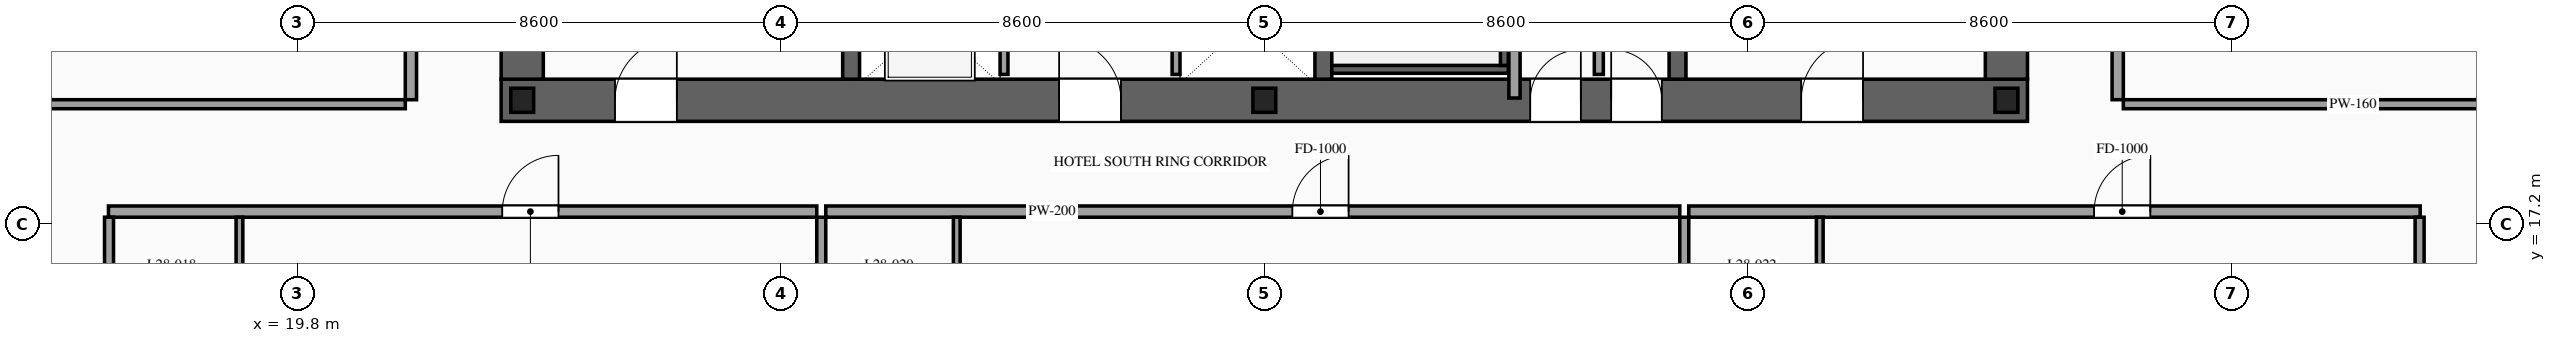
"""IFC4 building model, lengths in metres.
Left out: names, types, materials, properties, quantities, classifications, styles, units other than length and angle.
Written with IfcOpenShell. Run it as: python <this file> out.ifc"""

import sys

from ifc_helpers import new_model, si_unit, direction, frame, frame_2d, origin, origin_2d, place, context, subcontext, project, spatial, rectangle, i_section, extrude, source, transform, mapped, element, fill, save


model = new_model("IFC4")
c1 = context("Model", 3, precision=1e-05, world=origin(), true_north=direction((0.0, 1.0)))
c2 = subcontext(c1, "Body", "Model", "MODEL_VIEW")
j1 = project(units=[si_unit("LENGTHUNIT", "METRE"), si_unit("PLANEANGLEUNIT", "RADIAN")], contexts=[c1])
p1 = place(None, origin())
s1 = spatial("IfcSite", under=j1, at=p1, CompositionType="ELEMENT")
p2 = place(p1, origin())
s2 = spatial("IfcBuilding", under=s1, at=p2, CompositionType="ELEMENT")
p3 = place(p2, frame((0.0, 0.0, 108.2)))
s3 = spatial("IfcBuildingStorey", under=s2, at=p3, CompositionType="ELEMENT", Elevation=108.2)
p4 = place(p3, frame((23.425, 19.4, 0.0), z_axis=(0.0, 0.0, 1.0), x_axis=(1.0, 0.0, 0.0)))
e1 = element("IfcWall", 1, at=p4, inside=s3, PredefinedType="SHEAR", context=c2, shape_type="SweptSolid", body=[
    extrude(rectangle(XDim=27.15, YDim=0.75, at=frame_2d((13.575, 0.0))), origin(), (0.0, 0.0, 1.0), 3.6),
])
p5 = place(p4, frame((2.025, 0.0, 0.0)))
e2 = element("IfcOpeningElement", 2, at=p5, cuts=e1, PredefinedType="OPENING", context=c2, shape_type="SweptSolid", body=[
    extrude(rectangle(XDim=1.1, YDim=2.2, at=frame_2d((0.55, 1.1))), frame((0.0, 0.39, 0.0), z_axis=(0.0, -1.0, 0.0), x_axis=(1.0, 0.0, 0.0)), (0.0, 0.0, 1.0), 0.78),
])
p6 = place(p4, frame((9.925, 0.0, 0.0)))
e3 = element("IfcOpeningElement", 3, at=p6, cuts=e1, PredefinedType="OPENING", context=c2, shape_type="SweptSolid", body=[
    extrude(rectangle(XDim=1.1, YDim=2.2, at=frame_2d((0.55, 1.1))), frame((0.0, 0.39, 0.0), z_axis=(0.0, -1.0, 0.0), x_axis=(1.0, 0.0, 0.0)), (0.0, 0.0, 1.0), 0.78),
])
p7 = place(p4, frame((23.125, 0.0, 0.0)))
e4 = element("IfcOpeningElement", 4, at=p7, cuts=e1, PredefinedType="OPENING", context=c2, shape_type="SweptSolid", body=[
    extrude(rectangle(XDim=1.1, YDim=2.2, at=frame_2d((0.55, 1.1))), frame((0.0, 0.39, 0.0), z_axis=(0.0, -1.0, 0.0), x_axis=(1.0, 0.0, 0.0)), (0.0, 0.0, 1.0), 0.78),
])
p8 = place(p4, frame((19.745, 0.0, 0.0)))
e5 = element("IfcOpeningElement", 5, at=p8, cuts=e1, PredefinedType="OPENING", context=c2, shape_type="SweptSolid", body=[
    extrude(rectangle(XDim=0.9, YDim=2.15, at=frame_2d((0.45, 1.075))), frame((0.0, 0.39, 0.0), z_axis=(0.0, -1.0, 0.0), x_axis=(1.0, 0.0, 0.0)), (0.0, 0.0, 1.0), 0.78),
])
p9 = place(p4, frame((18.305, 0.0, 0.0)))
e6 = element("IfcOpeningElement", 6, at=p9, cuts=e1, PredefinedType="OPENING", context=c2, shape_type="SweptSolid", body=[
    extrude(rectangle(XDim=0.9, YDim=2.15, at=frame_2d((0.45, 1.075))), frame((0.0, 0.39, 0.0), z_axis=(0.0, -1.0, 0.0), x_axis=(1.0, 0.0, 0.0)), (0.0, 0.0, 1.0), 0.78),
])
m1 = source(origin(), c2, "Body", "SweptSolid", [
    extrude(rectangle(XDim=12.05, YDim=0.75, at=frame_2d((6.025, 0.0))), origin(), (0.0, 0.0, 1.0), 3.6),
])
for number, where, z_axis, x_axis in (
    (7, (23.8, 19.775, 0.0), (0.0, 0.0, 1.0), (0.0, 1.0, 0.0)),
    (8, (50.2, 19.775, 0.0), (0.0, 0.0, 1.0), (0.0, 1.0, 0.0)),
):
    element("IfcWall", number, at=place(p3, frame(where, z_axis=z_axis, x_axis=x_axis)), inside=s3, PredefinedType="SHEAR", context=c2, shape_type="MappedRepresentation", body=[
        mapped(m1, transform((0.0, 0.0, 0.0), scale=1.0)),
    ])
m2 = source(origin(), c2, "Body", "SweptSolid", [
    extrude(rectangle(XDim=12.05, YDim=0.3, at=frame_2d((6.025, 0.0))), origin(), (0.0, 0.0, 1.0), 3.6),
])
for number, where, z_axis, x_axis in (
    (9, (29.65, 19.775, 0.0), (0.0, 0.0, 1.0), (0.0, 1.0, 0.0)),
    (10, (38.05, 19.775, 0.0), (0.0, 0.0, 1.0), (0.0, 1.0, 0.0)),
    (11, (44.35, 19.775, 0.0), (0.0, 0.0, 1.0), (0.0, 1.0, 0.0)),
):
    element("IfcWall", number, at=place(p3, frame(where, z_axis=z_axis, x_axis=x_axis)), inside=s3, PredefinedType="SOLIDWALL", context=c2, shape_type="MappedRepresentation", body=[
        mapped(m2, transform((0.0, 0.0, 0.0), scale=1.0)),
    ])
m3 = source(origin(), c2, "Body", "SweptSolid", [
    extrude(i_section(OverallWidth=0.407, OverallDepth=0.428, WebThickness=0.02, FlangeThickness=0.035, at=origin_2d()), origin(), (0.0, 0.0, 1.0), 3.6),
])
for number, where, z_axis, x_axis in (
    (12, (23.8, 19.4, 0.0), (0.0, 0.0, 1.0), (1.0, 0.0, 0.0)),
    (13, (37.0, 19.4, 0.0), (0.0, 0.0, 1.0), (1.0, 0.0, 0.0)),
    (14, (50.2, 19.4, 0.0), (0.0, 0.0, 1.0), (1.0, 0.0, 0.0)),
):
    element("IfcColumn", number, at=place(p3, frame(where, z_axis=z_axis, x_axis=x_axis)), inside=s3, PredefinedType="COLUMN", context=c2, shape_type="MappedRepresentation", body=[
        mapped(m3, transform((0.0, 0.0, 0.0), scale=1.0)),
    ])
p10 = place(p3, frame((32.37, 19.86, 0.0), z_axis=(0.0, 0.0, 1.0), x_axis=(0.0, 1.0, 0.0)))
e15 = element("IfcWall", 15, at=p10, inside=s3, PredefinedType="SOLIDWALL", context=c2, shape_type="SweptSolid", body=[
    extrude(rectangle(XDim=2.04, YDim=0.14, at=frame_2d((1.02, 0.0))), origin(), (0.0, 0.0, 1.0), 3.38),
])
p11 = place(p10, frame((0.47, 0.0, 0.0)))
e16 = element("IfcOpeningElement", 16, at=p11, cuts=e15, PredefinedType="OPENING", context=c2, shape_type="SweptSolid", body=[
    extrude(rectangle(XDim=1.1, YDim=2.2, at=frame_2d((0.55, 1.1))), frame((0.0, 0.085, 0.0), z_axis=(0.0, -1.0, 0.0), x_axis=(1.0, 0.0, 0.0)), (0.0, 0.0, 1.0), 0.17),
])
m4 = source(origin(), c2, "Body", "SweptSolid", [
    extrude(rectangle(XDim=2.04, YDim=0.14, at=frame_2d((1.02, 0.0))), origin(), (0.0, 0.0, 1.0), 3.38),
])
p12 = place(p3, frame((35.43, 19.86, 0.0), z_axis=(0.0, 0.0, 1.0), x_axis=(0.0, 1.0, 0.0)))
e17 = element("IfcWall", 17, at=p12, inside=s3, PredefinedType="SOLIDWALL", context=c2, shape_type="MappedRepresentation", body=[
    mapped(m4, transform((0.0, 0.0, 0.0), scale=1.0)),
])
m5 = source(origin(), c2, "Body", "SweptSolid", [
    extrude(rectangle(XDim=3.14, YDim=0.14, at=frame_2d((1.57, 0.0))), origin(), (0.0, 0.0, 1.0), 3.38),
])
p13 = place(p3, frame((38.2, 19.95, 0.0), z_axis=(0.0, 0.0, 1.0), x_axis=(1.0, 0.0, 0.0)))
e18 = element("IfcWall", 18, at=p13, inside=s3, PredefinedType="SOLIDWALL", context=c2, shape_type="MappedRepresentation", body=[
    mapped(m5, transform((0.0, 0.0, 0.0), scale=1.0)),
])
m6 = source(origin(), c2, "Body", "SweptSolid", [
    extrude(rectangle(XDim=8.94, YDim=0.14, at=frame_2d((4.47, 0.0))), origin(), (0.0, 0.0, 1.0), 3.38),
])
p14 = place(p3, frame((41.27, 20.02, 0.0), z_axis=(0.0, 0.0, 1.0), x_axis=(0.0, 1.0, 0.0)))
e19 = element("IfcWall", 19, at=p14, inside=s3, PredefinedType="SOLIDWALL", context=c2, shape_type="MappedRepresentation", body=[
    mapped(m6, transform((0.0, 0.0, 0.0), scale=1.0)),
])
m7 = source(origin(), c2, "Body", "SweptSolid", [
    extrude(rectangle(XDim=1.34, YDim=0.16, at=frame_2d((0.67, 0.0))), origin(), (0.0, 0.0, 1.0), 3.38),
])
p15 = place(p3, frame((42.95, 19.86, 0.0), z_axis=(0.0, 0.0, 1.0), x_axis=(0.0, 1.0, 0.0)))
e20 = element("IfcWall", 20, at=p15, inside=s3, PredefinedType="PARTITIONING", context=c2, shape_type="MappedRepresentation", body=[
    mapped(m7, transform((0.0, 0.0, 0.0), scale=1.0)),
])
m8 = source(origin(), c2, "Body", "SweptSolid", [
    extrude(rectangle(XDim=12.72, YDim=0.2, at=frame_2d((6.36, 0.0))), origin(), (0.0, 0.0, 1.0), 3.38),
])
p16 = place(p3, frame((41.45, 19.44, 0.0), z_axis=(0.0, 0.0, 1.0), x_axis=(0.0, 1.0, 0.0)))
e21 = element("IfcWall", 21, at=p16, inside=s3, PredefinedType="PARTITIONING", context=c2, shape_type="MappedRepresentation", body=[
    mapped(m8, transform((0.0, 0.0, 0.0), scale=1.0)),
])
p17 = place(p3, frame((16.44, 17.42, 0.0), z_axis=(0.0, 0.0, 1.0), x_axis=(1.0, 0.0, 0.0)))
e22 = element("IfcWall", 22, at=p17, inside=s3, PredefinedType="PARTITIONING", context=c2, shape_type="SweptSolid", body=[
    extrude(rectangle(XDim=12.599, YDim=0.2, at=frame_2d((6.3, 0.0))), origin(), (0.0, 0.0, 1.0), 3.38),
])
p18 = place(p17, frame((7.005, 0.0, 0.0)))
e23 = element("IfcOpeningElement", 23, at=p18, cuts=e22, PredefinedType="OPENING", context=c2, shape_type="SweptSolid", body=[
    extrude(rectangle(XDim=1.0, YDim=2.2, at=frame_2d((0.5, 1.1))), frame((0.0, 0.115, 0.0), z_axis=(0.0, -1.0, 0.0), x_axis=(1.0, 0.0, 0.0)), (0.0, 0.0, 1.0), 0.23),
])
m9 = source(origin(), c2, "Body", "SweptSolid", [
    extrude(rectangle(XDim=14.97, YDim=0.16, at=frame_2d((7.485, 0.0))), origin(), (0.0, 0.0, 1.0), 3.38),
])
p19 = place(p3, frame((29.119, 2.35, 0.0), z_axis=(0.0, 0.0, 1.0), x_axis=(0.0, 1.0, 0.0)))
e24 = element("IfcWall", 24, at=p19, inside=s3, PredefinedType="PARTITIONING", context=c2, shape_type="MappedRepresentation", body=[
    mapped(m9, transform((0.0, 0.0, 0.0), scale=1.0)),
])
m10 = source(origin(), c2, "Body", "SweptSolid", [
    extrude(rectangle(XDim=2.42, YDim=0.12, at=frame_2d((1.21, 0.0))), origin(), (0.0, 0.0, 1.0), 3.38),
])
p20 = place(p3, frame((18.77, 14.9, 0.0), z_axis=(0.0, 0.0, 1.0), x_axis=(0.0, 1.0, 0.0)))
e25 = element("IfcWall", 25, at=p20, inside=s3, PredefinedType="PARTITIONING", context=c2, shape_type="MappedRepresentation", body=[
    mapped(m10, transform((0.0, 0.0, 0.0), scale=1.0)),
])
p21 = place(p3, frame((29.199, 17.42, 0.0), z_axis=(0.0, 0.0, 1.0), x_axis=(1.0, 0.0, 0.0)))
e26 = element("IfcWall", 26, at=p21, inside=s3, PredefinedType="PARTITIONING", context=c2, shape_type="SweptSolid", body=[
    extrude(rectangle(XDim=15.191, YDim=0.2, at=frame_2d((7.595, 0.0))), origin(), (0.0, 0.0, 1.0), 3.38),
])
p22 = place(p21, frame((8.3, 0.0, 0.0)))
e27 = element("IfcOpeningElement", 27, at=p22, cuts=e26, PredefinedType="OPENING", context=c2, shape_type="SweptSolid", body=[
    extrude(rectangle(XDim=1.0, YDim=2.2, at=frame_2d((0.5, 1.1))), frame((0.0, 0.115, 0.0), z_axis=(0.0, -1.0, 0.0), x_axis=(1.0, 0.0, 0.0)), (0.0, 0.0, 1.0), 0.23),
])
p23 = place(p3, frame((44.47, 2.35, 0.0), z_axis=(0.0, 0.0, 1.0), x_axis=(0.0, 1.0, 0.0)))
e28 = element("IfcWall", 28, at=p23, inside=s3, PredefinedType="PARTITIONING", context=c2, shape_type="MappedRepresentation", body=[
    mapped(m9, transform((0.0, 0.0, 0.0), scale=1.0)),
])
p24 = place(p3, frame((31.529, 14.9, 0.0), z_axis=(0.0, 0.0, 1.0), x_axis=(0.0, 1.0, 0.0)))
e29 = element("IfcWall", 29, at=p24, inside=s3, PredefinedType="PARTITIONING", context=c2, shape_type="MappedRepresentation", body=[
    mapped(m10, transform((0.0, 0.0, 0.0), scale=1.0)),
])
p25 = place(p3, frame((44.55, 17.42, 0.0), z_axis=(0.0, 0.0, 1.0), x_axis=(1.0, 0.0, 0.0)))
e30 = element("IfcWall", 30, at=p25, inside=s3, PredefinedType="PARTITIONING", context=c2, shape_type="SweptSolid", body=[
    extrude(rectangle(XDim=13.01, YDim=0.2, at=frame_2d((6.505, 0.0))), origin(), (0.0, 0.0, 1.0), 3.38),
])
p26 = place(p25, frame((7.21, 0.0, 0.0)))
e31 = element("IfcOpeningElement", 31, at=p26, cuts=e30, PredefinedType="OPENING", context=c2, shape_type="SweptSolid", body=[
    extrude(rectangle(XDim=1.0, YDim=2.2, at=frame_2d((0.5, 1.1))), frame((0.0, 0.115, 0.0), z_axis=(0.0, -1.0, 0.0), x_axis=(1.0, 0.0, 0.0)), (0.0, 0.0, 1.0), 0.23),
])
m11 = source(origin(), c2, "Body", "SweptSolid", [
    extrude(rectangle(XDim=14.82, YDim=0.16, at=frame_2d((7.41, 0.0))), origin(), (0.0, 0.0, 1.0), 3.38),
])
for number, where, z_axis, x_axis in (
    (32, (16.45, 2.5, 0.0), (0.0, 0.0, 1.0), (0.0, 1.0, 0.0)),
    (33, (57.55, 2.5, 0.0), (0.0, 0.0, 1.0), (0.0, 1.0, 0.0)),
):
    element("IfcWall", number, at=place(p3, frame(where, z_axis=z_axis, x_axis=x_axis)), inside=s3, PredefinedType="PARTITIONING", context=c2, shape_type="MappedRepresentation", body=[
        mapped(m11, transform((0.0, 0.0, 0.0), scale=1.0)),
    ])
p27 = place(p3, frame((46.88, 14.9, 0.0), z_axis=(0.0, 0.0, 1.0), x_axis=(0.0, 1.0, 0.0)))
e34 = element("IfcWall", 34, at=p27, inside=s3, PredefinedType="PARTITIONING", context=c2, shape_type="MappedRepresentation", body=[
    mapped(m10, transform((0.0, 0.0, 0.0), scale=1.0)),
])
p28 = place(p3, frame((21.82, 19.41, 0.0), z_axis=(0.0, 0.0, 1.0), x_axis=(0.0, 1.0, 0.0)))
e35 = element("IfcWall", 35, at=p28, inside=s3, PredefinedType="PARTITIONING", context=c2, shape_type="SweptSolid", body=[
    extrude(rectangle(XDim=12.78, YDim=0.2, at=frame_2d((6.39, 0.0))), origin(), (0.0, 0.0, 1.0), 3.38),
])
p29 = place(p28, frame((5.89, 0.0, 0.0)))
e36 = element("IfcOpeningElement", 36, at=p29, cuts=e35, PredefinedType="OPENING", context=c2, shape_type="SweptSolid", body=[
    extrude(rectangle(XDim=1.0, YDim=2.2, at=frame_2d((0.5, 1.1))), frame((0.0, 0.115, 0.0), z_axis=(0.0, -1.0, 0.0), x_axis=(1.0, 0.0, 0.0)), (0.0, 0.0, 1.0), 0.23),
])
m12 = source(origin(), c2, "Body", "SweptSolid", [
    extrude(rectangle(XDim=8.17, YDim=0.16, at=frame_2d((4.085, 0.0))), origin(), (0.0, 0.0, 1.0), 2.875),
])
p30 = place(p3, frame((13.55, 19.33, 0.0), z_axis=(0.0, 0.0, 1.0), x_axis=(1.0, 0.0, 0.0)))
e37 = element("IfcWall", 37, at=p30, inside=s3, PredefinedType="PARTITIONING", context=c2, shape_type="MappedRepresentation", body=[
    mapped(m12, transform((0.0, 0.0, 0.0), scale=1.0)),
])
p31 = place(p3, frame((52.18, 19.41, 0.0), z_axis=(0.0, 0.0, 1.0), x_axis=(0.0, 1.0, 0.0)))
e38 = element("IfcWall", 38, at=p31, inside=s3, PredefinedType="PARTITIONING", context=c2, shape_type="SweptSolid", body=[
    extrude(rectangle(XDim=12.78, YDim=0.2, at=frame_2d((6.39, 0.0))), origin(), (0.0, 0.0, 1.0), 3.38),
])
p32 = place(p31, frame((5.89, 0.0, 0.0)))
e39 = element("IfcOpeningElement", 39, at=p32, cuts=e38, PredefinedType="OPENING", context=c2, shape_type="SweptSolid", body=[
    extrude(rectangle(XDim=1.0, YDim=2.2, at=frame_2d((0.5, 1.1))), frame((0.0, 0.115, 0.0), z_axis=(0.0, -1.0, 0.0), x_axis=(1.0, 0.0, 0.0)), (0.0, 0.0, 1.0), 0.23),
])
p33 = place(p3, frame((52.28, 19.33, 0.0), z_axis=(0.0, 0.0, 1.0), x_axis=(1.0, 0.0, 0.0)))
e40 = element("IfcWall", 40, at=p33, inside=s3, PredefinedType="PARTITIONING", context=c2, shape_type="MappedRepresentation", body=[
    mapped(m12, transform((0.0, 0.0, 0.0), scale=1.0)),
])
m13 = source(origin(), c2, "Body", "SweptSolid", [
    extrude(rectangle(XDim=1.1, YDim=2.2, at=frame_2d((0.55, 1.1))), frame((0.0, 0.025, 0.0), z_axis=(0.0, -1.0, 0.0), x_axis=(1.0, 0.0, 0.0)), (0.0, 0.0, 1.0), 0.05),
])
p34 = place(p5, origin())
e41 = element("IfcDoor", 41, at=p34, inside=s3, OperationType="SINGLE_SWING_RIGHT", PredefinedType="DOOR", context=c2, shape_type="MappedRepresentation", body=[
    mapped(m13, transform((0.0, 0.0, 0.0), scale=1.0)),
])
fill(e2, e41)
p35 = place(p6, origin())
e42 = element("IfcDoor", 42, at=p35, inside=s3, OperationType="SINGLE_SWING_LEFT", PredefinedType="DOOR", context=c2, shape_type="MappedRepresentation", body=[
    mapped(m13, transform((0.0, 0.0, 0.0), scale=1.0)),
])
fill(e3, e42)
p36 = place(p7, origin())
e43 = element("IfcDoor", 43, at=p36, inside=s3, OperationType="SINGLE_SWING_RIGHT", PredefinedType="DOOR", context=c2, shape_type="MappedRepresentation", body=[
    mapped(m13, transform((0.0, 0.0, 0.0), scale=1.0)),
])
fill(e4, e43)
m14 = source(origin(), c2, "Body", "SweptSolid", [
    extrude(rectangle(XDim=0.9, YDim=2.15, at=frame_2d((0.45, 1.075))), frame((0.0, 0.025, 0.0), z_axis=(0.0, -1.0, 0.0), x_axis=(1.0, 0.0, 0.0)), (0.0, 0.0, 1.0), 0.05),
])
p37 = place(p8, origin())
e44 = element("IfcDoor", 44, at=p37, inside=s3, OperationType="SINGLE_SWING_LEFT", PredefinedType="DOOR", context=c2, shape_type="MappedRepresentation", body=[
    mapped(m14, transform((0.0, 0.0, 0.0), scale=1.0)),
])
fill(e5, e44)
p38 = place(p9, origin())
e45 = element("IfcDoor", 45, at=p38, inside=s3, OperationType="SINGLE_SWING_RIGHT", PredefinedType="DOOR", context=c2, shape_type="MappedRepresentation", body=[
    mapped(m14, transform((0.0, 0.0, 0.0), scale=1.0)),
])
fill(e6, e45)
m15 = source(origin(), c2, "Body", "SweptSolid", [
    extrude(rectangle(XDim=1.0, YDim=2.2, at=frame_2d((0.5, 1.1))), frame((0.0, 0.025, 0.0), z_axis=(0.0, -1.0, 0.0), x_axis=(1.0, 0.0, 0.0)), (0.0, 0.0, 1.0), 0.05),
])
p39 = place(p18, origin())
e46 = element("IfcDoor", 46, at=p39, inside=s3, OperationType="SINGLE_SWING_RIGHT", PredefinedType="DOOR", context=c2, shape_type="MappedRepresentation", body=[
    mapped(m15, transform((0.0, 0.0, 0.0), scale=1.0)),
])
fill(e23, e46)
p40 = place(p22, origin())
e47 = element("IfcDoor", 47, at=p40, inside=s3, OperationType="SINGLE_SWING_RIGHT", PredefinedType="DOOR", context=c2, shape_type="MappedRepresentation", body=[
    mapped(m15, transform((0.0, 0.0, 0.0), scale=1.0)),
])
fill(e27, e47)
p41 = place(p26, origin())
e48 = element("IfcDoor", 48, at=p41, inside=s3, OperationType="SINGLE_SWING_RIGHT", PredefinedType="DOOR", context=c2, shape_type="MappedRepresentation", body=[
    mapped(m15, transform((0.0, 0.0, 0.0), scale=1.0)),
])
fill(e31, e48)
save(model, sys.argv[1])
